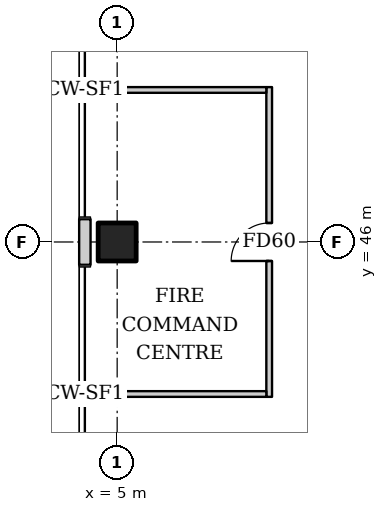
"""IFC4 building model, lengths in metres.
Left out: names, types, materials, properties, quantities, classifications, styles, units other than length and angle.
Written with IfcOpenShell. Run it as: python <this file> out.ifc"""

import sys

from ifc_helpers import new_model, si_unit, direction, frame, frame_2d, origin, origin_2d, place, context, subcontext, project, spatial, rectangle, extrude, element, fill, save


model = new_model("IFC4")
c1 = context("Model", 3, precision=1e-05, world=origin(), true_north=direction((0.0, 1.0)))
c2 = subcontext(c1, "Body", "Model", "MODEL_VIEW")
j1 = project(units=[si_unit("LENGTHUNIT", "METRE"), si_unit("PLANEANGLEUNIT", "RADIAN")], contexts=[c1])
p1 = place(None, origin())
s1 = spatial("IfcSite", under=j1, at=p1, CompositionType="ELEMENT")
p2 = place(p1, origin())
s2 = spatial("IfcBuilding", under=s1, at=p2, CompositionType="ELEMENT")
p3 = place(p2, origin())
s3 = spatial("IfcBuildingStorey", under=s2, at=p3, CompositionType="ELEMENT", Elevation=0.0)
p4 = place(p3, frame((5.0, 46.0, 0.0), z_axis=(0.0, 0.0, 1.0), x_axis=(1.0, 0.0, 0.0)))
e1 = element("IfcColumn", 1, at=p4, inside=s3, PredefinedType="COLUMN", context=c2, shape_type="SweptSolid", body=[
    extrude(rectangle(XDim=1.0, YDim=1.0, at=origin_2d()), origin(), (0.0, 0.0, 1.0), 6.0),
])
p5 = place(p3, frame((4.15, 46.6, 0.0), z_axis=(0.0, 0.0, 1.0), x_axis=(0.0, -1.0, 0.0)))
e2 = element("IfcWall", 2, at=p5, inside=s3, PredefinedType="SOLIDWALL", context=c2, shape_type="SweptSolid", body=[
    extrude(rectangle(XDim=1.2, YDim=0.3, at=frame_2d((0.6, 0.0))), origin(), (0.0, 0.0, 1.0), 5.7),
])
p6 = place(p3, frame((9.0, 41.925, 0.0), z_axis=(0.0, 0.0, 1.0), x_axis=(0.0, 1.0, 0.0)))
e3 = element("IfcWall", 3, at=p6, inside=s3, PredefinedType="PARTITIONING", context=c2, shape_type="SweptSolid", body=[
    extrude(rectangle(XDim=8.15, YDim=0.15, at=frame_2d((4.075, 0.0))), origin(), (0.0, 0.0, 1.0), 4.2),
])
p7 = place(p6, frame((3.575, 0.0, 0.0)))
e4 = element("IfcOpeningElement", 4, at=p7, cuts=e3, PredefinedType="OPENING", context=c2, shape_type="SweptSolid", body=[
    extrude(rectangle(XDim=1.0, YDim=2.1, at=frame_2d((0.5, 1.05))), frame((0.0, 0.085, 0.0), z_axis=(0.0, -1.0, 0.0), x_axis=(1.0, 0.0, 0.0)), (0.0, 0.0, 1.0), 0.17),
])
for number, where, z_axis, x_axis in (
    (5, (8.925, 42.0, 0.0), (0.0, 0.0, 1.0), (-1.0, 0.0, 0.0)),
    (6, (8.925, 50.0, 0.0), (0.0, 0.0, 1.0), (-1.0, 0.0, 0.0)),
):
    element("IfcWall", number, at=place(p3, frame(where, z_axis=z_axis, x_axis=x_axis)), inside=s3, PredefinedType="PARTITIONING", context=c2, shape_type="SweptSolid", body=[
        extrude(rectangle(XDim=4.625, YDim=0.15, at=frame_2d((2.312, 0.0))), origin(), (0.0, 0.0, 1.0), 4.2),
    ])
p8 = place(p7, origin())
e7 = element("IfcDoor", 7, at=p8, inside=s3, OperationType="SINGLE_SWING_LEFT", PredefinedType="DOOR", context=c2, shape_type="SweptSolid", body=[
    extrude(rectangle(XDim=1.0, YDim=2.1, at=frame_2d((0.5, 1.05))), frame((0.0, 0.025, 0.0), z_axis=(0.0, -1.0, 0.0), x_axis=(1.0, 0.0, 0.0)), (0.0, 0.0, 1.0), 0.05),
])
fill(e4, e7)
save(model, sys.argv[1])
